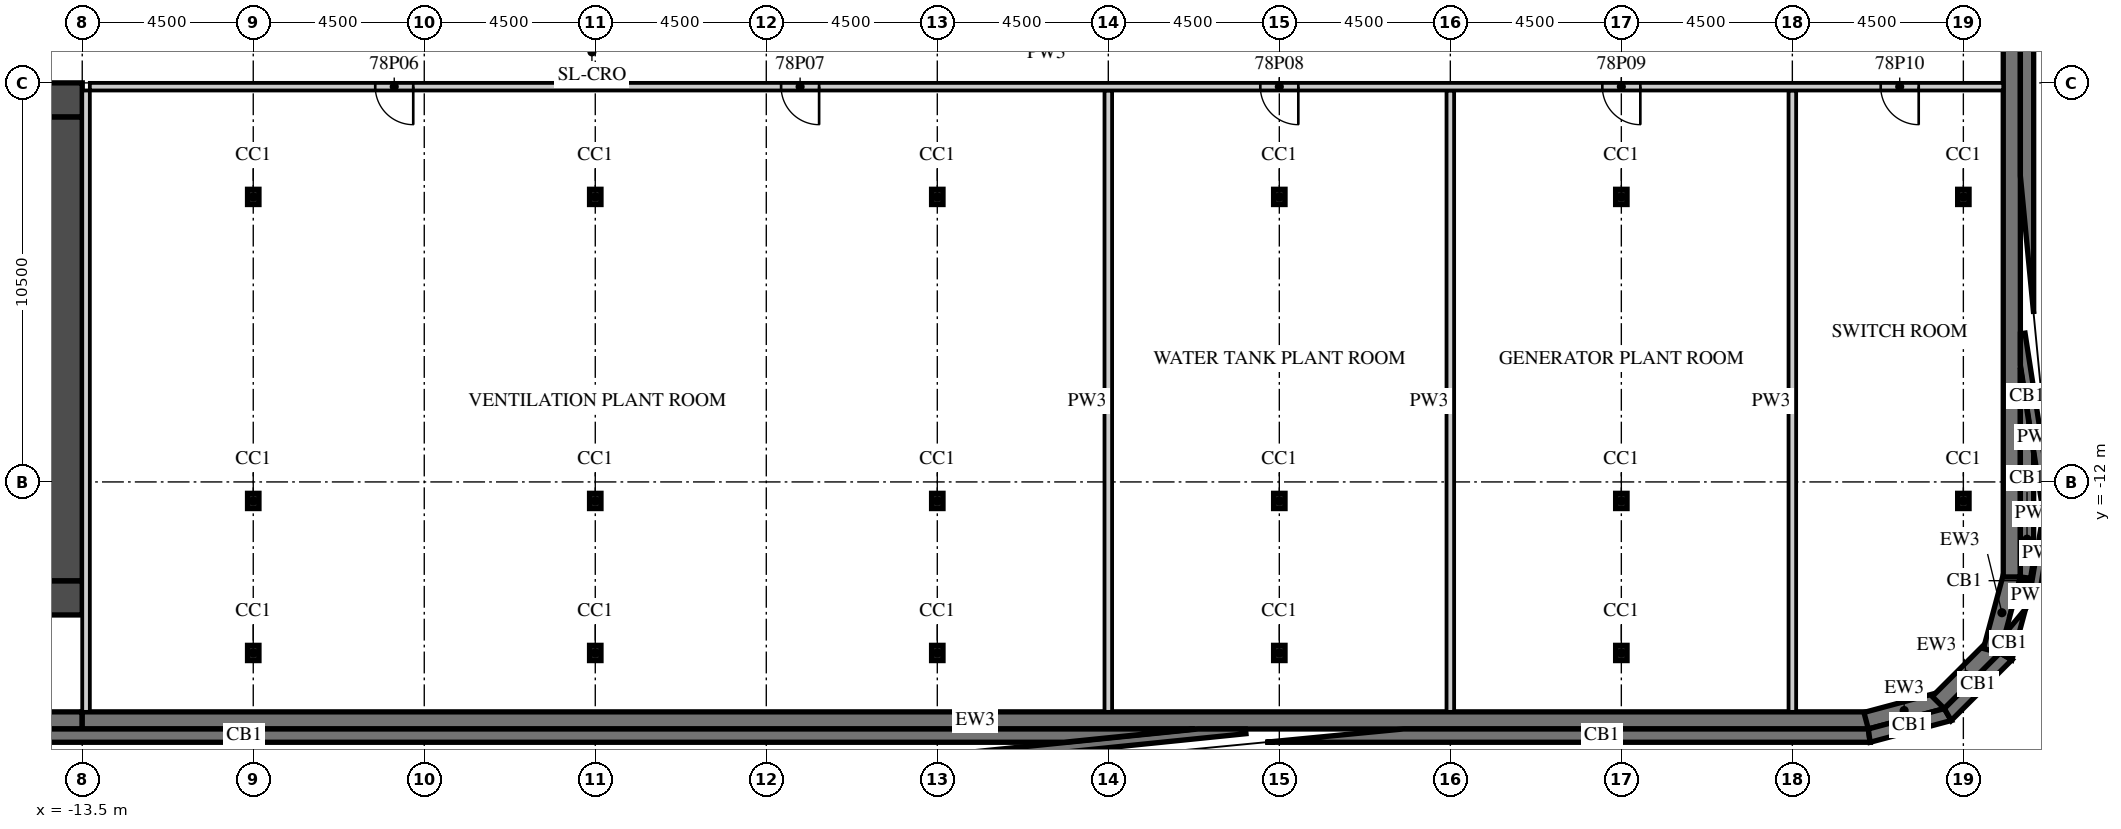
"""IFC4 building model, lengths in metres.
Left out: names, types, materials, properties, quantities, classifications, styles, units other than length and angle.
Written with IfcOpenShell. Run it as: python <this file> out.ifc"""

import sys

from ifc_helpers import new_model, si_unit, direction, frame, frame_2d, origin, origin_2d, place, context, subcontext, project, spatial, polyline, rectangle, i_section, outline, extrude, element, fill, save


model = new_model("IFC4")
c1 = context("Model", 3, precision=1e-05, world=origin(), true_north=direction((0.0, 1.0)))
c2 = subcontext(c1, "Body", "Model", "MODEL_VIEW")
j1 = project(units=[si_unit("LENGTHUNIT", "METRE"), si_unit("PLANEANGLEUNIT", "RADIAN")], contexts=[c1])
p1 = place(None, origin())
s1 = spatial("IfcSite", under=j1, at=p1, CompositionType="ELEMENT")
p2 = place(p1, origin())
s2 = spatial("IfcBuilding", under=s1, at=p2, CompositionType="ELEMENT")
p3 = place(p2, frame((0.0, 0.0, 308.1)))
s3 = spatial("IfcBuildingStorey", under=s2, at=p3, CompositionType="ELEMENT", Elevation=308.1)
for number, where, z_axis, x_axis in (
    (1, (-9.0, -16.5, 0.0), (0.0, 0.0, 1.0), (1.0, 0.0, 0.0)),
    (2, (-9.0, -12.5, 0.0), (0.0, 0.0, 1.0), (1.0, 0.0, 0.0)),
    (3, (-9.0, -4.5, 0.0), (0.0, 0.0, 1.0), (1.0, 0.0, 0.0)),
    (4, (0.0, -16.5, 0.0), (0.0, 0.0, 1.0), (1.0, 0.0, 0.0)),
    (5, (0.0, -12.5, 0.0), (0.0, 0.0, 1.0), (1.0, 0.0, 0.0)),
    (6, (0.0, -4.5, 0.0), (0.0, 0.0, 1.0), (1.0, 0.0, 0.0)),
    (7, (9.0, -16.5, 0.0), (0.0, 0.0, 1.0), (1.0, 0.0, 0.0)),
    (8, (9.0, -12.5, 0.0), (0.0, 0.0, 1.0), (1.0, 0.0, 0.0)),
    (9, (9.0, -4.5, 0.0), (0.0, 0.0, 1.0), (1.0, 0.0, 0.0)),
    (10, (18.0, -16.5, 0.0), (0.0, 0.0, 1.0), (1.0, 0.0, 0.0)),
    (11, (18.0, -12.5, 0.0), (0.0, 0.0, 1.0), (1.0, 0.0, 0.0)),
    (12, (18.0, -4.5, 0.0), (0.0, 0.0, 1.0), (1.0, 0.0, 0.0)),
    (13, (27.0, -16.5, 0.0), (0.0, 0.0, 1.0), (1.0, 0.0, 0.0)),
    (14, (27.0, -12.5, 0.0), (0.0, 0.0, 1.0), (1.0, 0.0, 0.0)),
    (15, (27.0, -4.5, 0.0), (0.0, 0.0, 1.0), (1.0, 0.0, 0.0)),
    (16, (36.0, -12.5, 0.0), (0.0, 0.0, 1.0), (1.0, 0.0, 0.0)),
    (17, (36.0, -4.5, 0.0), (0.0, 0.0, 1.0), (1.0, 0.0, 0.0)),
):
    element("IfcColumn", number, at=place(p3, frame(where, z_axis=z_axis, x_axis=x_axis)), inside=s3, PredefinedType="COLUMN", context=c2, shape_type="SweptSolid", body=[
        extrude(i_section(OverallWidth=0.3, OverallDepth=0.4, WebThickness=0.013, FlangeThickness=0.024, FilletRadius=0.027, at=origin_2d()), origin(), (0.0, 0.0, 1.0), 5.5),
    ])
p4 = place(p3, frame((-31.5, -18.275, 0.0), z_axis=(0.0, 0.0, 1.0), x_axis=(1.0, 0.0, 0.0)))
e18 = element("IfcWall", 18, at=p4, inside=s3, PredefinedType="SOLIDWALL", context=c2, shape_type="SweptSolid", body=[
    extrude(rectangle(XDim=18.0, YDim=0.45, at=frame_2d((9.0, 0.0))), origin(), (0.0, 0.0, 1.0), 5.1),
])
p5 = place(p3, frame((-13.5, -18.275, 0.0), z_axis=(0.0, 0.0, 1.0), x_axis=(1.0, 0.0, 0.0)))
e19 = element("IfcWall", 19, at=p5, inside=s3, PredefinedType="SOLIDWALL", context=c2, shape_type="SweptSolid", body=[
    extrude(rectangle(XDim=47.0, YDim=0.45, at=frame_2d((23.5, 0.0))), origin(), (0.0, 0.0, 1.0), 5.1),
])
p6 = place(p3, frame((33.442, -18.283, 0.0), z_axis=(0.0, 0.0, 1.0), x_axis=(0.965926999034, 0.25881466832, 0.0)))
e20 = element("IfcWall", 20, at=p6, inside=s3, PredefinedType="SOLIDWALL", context=c2, shape_type="SweptSolid", body=[
    extrude(outline(polyline([(0.0, -0.225), (2.071, -0.225), (1.95, 0.225), (0.121, 0.225), (0.0, -0.225)])), origin(), (0.0, 0.0, 1.0), 5.1),
])
p7 = place(p3, frame((35.341, -17.805, 0.0), z_axis=(0.0, 0.0, 1.0), x_axis=(0.707106781187, 0.707106781187, 0.0)))
e21 = element("IfcWall", 21, at=p7, inside=s3, PredefinedType="SOLIDWALL", context=c2, shape_type="SweptSolid", body=[
    extrude(outline(polyline([(0.0, -0.225), (2.071, -0.225), (1.95, 0.225), (0.121, 0.225), (0.0, -0.225)])), origin(), (0.0, 0.0, 1.0), 5.1),
])
p8 = place(p3, frame((36.747, -16.442, 0.0), z_axis=(0.0, 0.0, 1.0), x_axis=(0.25881466832, 0.965926999034, 0.0)))
e22 = element("IfcWall", 22, at=p8, inside=s3, PredefinedType="SOLIDWALL", context=c2, shape_type="SweptSolid", body=[
    extrude(outline(polyline([(-0.0, -0.225), (2.07, -0.225), (1.95, 0.225), (0.12, 0.225), (-0.0, -0.225)])), origin(), (0.0, 0.0, 1.0), 5.1),
])
p9 = place(p3, frame((37.275, -14.5, 0.0), z_axis=(0.0, 0.0, 1.0), x_axis=(0.0, 1.0, 0.0)))
e23 = element("IfcWall", 23, at=p9, inside=s3, PredefinedType="SOLIDWALL", context=c2, shape_type="SweptSolid", body=[
    extrude(rectangle(XDim=29.0, YDim=0.45, at=frame_2d((14.5, 0.0))), origin(), (0.0, 0.0, 1.0), 5.1),
])
p10 = place(p3, origin())
e24 = element("IfcWall", 24, at=p10, inside=s3, PredefinedType="PARAPET", context=c2, shape_type="SweptSolid", body=[
    extrude(outline(polyline([(17.122, -18.624), (17.11, -18.501), (15.864, -18.501), (-33.916, -23.562), (-33.924, -23.815), (17.122, -18.624)])), origin(), (0.0, 0.0, 1.0), 1.1),
])
p11 = place(p3, origin())
e25 = element("IfcWall", 25, at=p11, inside=s3, PredefinedType="PARAPET", context=c2, shape_type="SweptSolid", body=[
    extrude(outline(polyline([(37.501, -12.707), (37.501, -12.957), (38.083, -12.957), (38.378, -12.707), (37.501, -12.707)])), origin(), (0.0, 0.0, 1.0), 1.1),
])
p12 = place(p3, origin())
e26 = element("IfcWall", 26, at=p12, inside=s3, PredefinedType="PARAPET", context=c2, shape_type="SweptSolid", body=[
    extrude(outline(polyline([(38.378, -12.707), (38.083, -12.957), (37.779, -14.771), (38.014, -14.878), (38.378, -12.707)])), origin(), (0.0, 0.0, 1.0), 1.1),
])
p13 = place(p3, origin())
e27 = element("IfcWall", 27, at=p13, inside=s3, PredefinedType="PARAPET", context=c2, shape_type="SweptSolid", body=[
    extrude(outline(polyline([(38.014, -14.878), (37.779, -14.771), (37.505, -15.103), (37.698, -15.262), (38.014, -14.878)])), origin(), (0.0, 0.0, 1.0), 1.1),
])
p14 = place(p3, origin())
e28 = element("IfcWall", 28, at=p14, inside=s3, PredefinedType="PARAPET", context=c2, shape_type="SweptSolid", body=[
    extrude(outline(polyline([(37.624, -8.084), (37.501, -8.103), (37.501, -8.929), (38.084, -12.707), (38.376, -12.957), (37.624, -8.084)])), origin(), (0.0, 0.0, 1.0), 1.1),
])
p15 = place(p3, origin())
e29 = element("IfcWall", 29, at=p15, inside=s3, PredefinedType="SOLIDWALL", context=c2, shape_type="SweptSolid", body=[
    extrude(outline(polyline([(-32.5, -18.5), (-32.546, -18.85), (12.333, -18.85), (15.775, -18.5), (-32.5, -18.5)])), origin(), (0.0, 0.0, 1.0), 2.0),
])
p16 = place(p3, origin())
e30 = element("IfcWall", 30, at=p16, inside=s3, PredefinedType="SOLIDWALL", context=c2, shape_type="SweptSolid", body=[
    extrude(outline(polyline([(21.27, -18.5), (17.635, -18.85), (33.546, -18.85), (33.5, -18.5), (21.27, -18.5)])), origin(), (0.0, 0.0, 1.0), 2.0),
])
p17 = place(p3, origin())
e31 = element("IfcWall", 31, at=p17, inside=s3, PredefinedType="SOLIDWALL", context=c2, shape_type="SweptSolid", body=[
    extrude(outline(polyline([(33.5, -18.5), (33.546, -18.85), (35.681, -18.278), (35.5, -17.964), (33.5, -18.5)])), origin(), (0.0, 0.0, 1.0), 2.0),
])
p18 = place(p3, origin())
e32 = element("IfcWall", 32, at=p18, inside=s3, PredefinedType="SOLIDWALL", context=c2, shape_type="SweptSolid", body=[
    extrude(outline(polyline([(35.5, -17.964), (35.681, -18.278), (37.278, -16.681), (36.964, -16.5), (35.5, -17.964)])), origin(), (0.0, 0.0, 1.0), 2.0),
])
p19 = place(p3, origin())
e33 = element("IfcWall", 33, at=p19, inside=s3, PredefinedType="SOLIDWALL", context=c2, shape_type="SweptSolid", body=[
    extrude(outline(polyline([(36.964, -16.5), (37.278, -16.681), (37.639, -15.334), (37.102, -15.985), (36.964, -16.5)])), origin(), (0.0, 0.0, 1.0), 2.0),
])
p20 = place(p3, origin())
e34 = element("IfcWall", 34, at=p20, inside=s3, PredefinedType="SOLIDWALL", context=c2, shape_type="SweptSolid", body=[
    extrude(outline(polyline([(37.289, -15.287), (37.732, -14.75), (37.768, -14.535), (37.5, -14.5), (37.289, -15.287)])), origin(), (0.0, 0.0, 1.0), 2.0),
])
p21 = place(p3, origin())
e35 = element("IfcWall", 35, at=p21, inside=s3, PredefinedType="SOLIDWALL", context=c2, shape_type="SweptSolid", body=[
    extrude(outline(polyline([(37.5, -14.5), (37.768, -14.535), (37.85, -14.044), (37.85, -12.967), (37.5, -12.967), (37.5, -14.5)])), origin(), (0.0, 0.0, 1.0), 2.0),
])
p22 = place(p3, origin())
e36 = element("IfcWall", 36, at=p22, inside=s3, PredefinedType="SOLIDWALL", context=c2, shape_type="SweptSolid", body=[
    extrude(outline(polyline([(37.5, -12.697), (37.85, -12.697), (37.85, -11.254), (37.5, -8.988), (37.5, -12.697)])), origin(), (0.0, 0.0, 1.0), 2.0),
])
p23 = place(p3, origin())
e37 = element("IfcWall", 37, at=p23, inside=s3, PredefinedType="SOLIDWALL", context=c2, shape_type="SweptSolid", body=[
    extrude(outline(polyline([(37.5, -3.943), (37.85, -7.578), (37.85, 14.546), (37.5, 14.5), (37.5, -3.943)])), origin(), (0.0, 0.0, 1.0), 2.0),
])
p24 = place(p3, frame((-31.5, -1.95, 0.0), z_axis=(0.0, 0.0, 1.0), x_axis=(1.0, 0.0, 0.0)))
e38 = element("IfcWall", 38, at=p24, inside=s3, PredefinedType="SHEAR", context=c2, shape_type="SweptSolid", body=[
    extrude(rectangle(XDim=18.0, YDim=0.9, at=frame_2d((9.0, 0.0))), origin(), (0.0, 0.0, 1.0), 5.1),
])
p25 = place(p24, frame((14.725, 0.0, 0.0)))
e39 = element("IfcOpeningElement", 39, at=p25, cuts=e38, PredefinedType="OPENING", context=c2, shape_type="SweptSolid", body=[
    extrude(rectangle(XDim=1.8, YDim=2.1, at=frame_2d((0.9, 1.05))), frame((0.0, 0.46, 0.0), z_axis=(0.0, -1.0, 0.0), x_axis=(1.0, 0.0, 0.0)), (0.0, 0.0, 1.0), 0.92),
])
p26 = place(p3, frame((-20.3, -15.05, 0.0), z_axis=(0.0, 0.0, 1.0), x_axis=(1.0, 0.0, 0.0)))
e40 = element("IfcWall", 40, at=p26, inside=s3, PredefinedType="SHEAR", context=c2, shape_type="SweptSolid", body=[
    extrude(rectangle(XDim=6.8, YDim=0.9, at=frame_2d((3.4, 0.0))), origin(), (0.0, 0.0, 1.0), 5.1),
])
p27 = place(p26, frame((0.875, 0.0, 0.0)))
e41 = element("IfcOpeningElement", 41, at=p27, cuts=e40, PredefinedType="OPENING", context=c2, shape_type="SweptSolid", body=[
    extrude(rectangle(XDim=1.2, YDim=2.1, at=frame_2d((0.6, 1.05))), frame((0.0, 0.46, 0.0), z_axis=(0.0, -1.0, 0.0), x_axis=(1.0, 0.0, 0.0)), (0.0, 0.0, 1.0), 0.92),
])
p28 = place(p3, frame((-13.95, -14.6, 0.0), z_axis=(0.0, 0.0, 1.0), x_axis=(0.0, 1.0, 0.0)))
e42 = element("IfcWall", 42, at=p28, inside=s3, PredefinedType="SHEAR", context=c2, shape_type="SweptSolid", body=[
    extrude(rectangle(XDim=12.2, YDim=0.9, at=frame_2d((6.1, 0.0))), origin(), (0.0, 0.0, 1.0), 5.1),
])
for number, where, z_axis, x_axis in (
    (43, (13.5, -18.05, 0.0), (0.0, 0.0, 1.0), (0.0, 1.0, 0.0)),
    (44, (22.5, -18.05, 0.0), (0.0, 0.0, 1.0), (0.0, 1.0, 0.0)),
    (45, (31.5, -18.05, 0.0), (0.0, 0.0, 1.0), (0.0, 1.0, 0.0)),
):
    element("IfcWall", number, at=place(p3, frame(where, z_axis=z_axis, x_axis=x_axis)), inside=s3, PredefinedType="PARTITIONING", context=c2, shape_type="SweptSolid", body=[
        extrude(rectangle(XDim=16.35, YDim=0.2, at=frame_2d((8.175, 0.0))), origin(), (0.0, 0.0, 1.0), 5.1),
    ])
p29 = place(p3, frame((-13.3, -1.6, 0.0), z_axis=(0.0, 0.0, 1.0), x_axis=(1.0, 0.0, 0.0)))
e46 = element("IfcWall", 46, at=p29, inside=s3, PredefinedType="PARTITIONING", context=c2, shape_type="SweptSolid", body=[
    extrude(rectangle(XDim=50.35, YDim=0.2, at=frame_2d((25.175, 0.0))), origin(), (0.0, 0.0, 1.0), 4.6),
])
p30 = place(p29, frame((7.51, 0.0, 0.0)))
e47 = element("IfcOpeningElement", 47, at=p30, cuts=e46, PredefinedType="OPENING", context=c2, shape_type="SweptSolid", body=[
    extrude(rectangle(XDim=1.0, YDim=2.1, at=frame_2d((0.5, 1.05))), frame((0.0, 0.11, 0.0), z_axis=(0.0, -1.0, 0.0), x_axis=(1.0, 0.0, 0.0)), (0.0, 0.0, 1.0), 0.22),
])
p31 = place(p29, frame((18.19, 0.0, 0.0)))
e48 = element("IfcOpeningElement", 48, at=p31, cuts=e46, PredefinedType="OPENING", context=c2, shape_type="SweptSolid", body=[
    extrude(rectangle(XDim=1.0, YDim=2.1, at=frame_2d((0.5, 1.05))), frame((0.0, 0.11, 0.0), z_axis=(0.0, -1.0, 0.0), x_axis=(1.0, 0.0, 0.0)), (0.0, 0.0, 1.0), 0.22),
])
p32 = place(p29, frame((30.8, 0.0, 0.0)))
e49 = element("IfcOpeningElement", 49, at=p32, cuts=e46, PredefinedType="OPENING", context=c2, shape_type="SweptSolid", body=[
    extrude(rectangle(XDim=1.0, YDim=2.1, at=frame_2d((0.5, 1.05))), frame((0.0, 0.11, 0.0), z_axis=(0.0, -1.0, 0.0), x_axis=(1.0, 0.0, 0.0)), (0.0, 0.0, 1.0), 0.22),
])
p33 = place(p29, frame((39.8, 0.0, 0.0)))
e50 = element("IfcOpeningElement", 50, at=p33, cuts=e46, PredefinedType="OPENING", context=c2, shape_type="SweptSolid", body=[
    extrude(rectangle(XDim=1.0, YDim=2.1, at=frame_2d((0.5, 1.05))), frame((0.0, 0.11, 0.0), z_axis=(0.0, -1.0, 0.0), x_axis=(1.0, 0.0, 0.0)), (0.0, 0.0, 1.0), 0.22),
])
p34 = place(p29, frame((47.125, 0.0, 0.0)))
e51 = element("IfcOpeningElement", 51, at=p34, cuts=e46, PredefinedType="OPENING", context=c2, shape_type="SweptSolid", body=[
    extrude(rectangle(XDim=1.0, YDim=2.1, at=frame_2d((0.5, 1.05))), frame((0.0, 0.11, 0.0), z_axis=(0.0, -1.0, 0.0), x_axis=(1.0, 0.0, 0.0)), (0.0, 0.0, 1.0), 0.22),
])
p35 = place(p3, frame((-13.4, -18.05, 0.0), z_axis=(0.0, 0.0, 1.0), x_axis=(0.0, 1.0, 0.0)))
e52 = element("IfcWall", 52, at=p35, inside=s3, PredefinedType="PARTITIONING", context=c2, shape_type="SweptSolid", body=[
    extrude(rectangle(XDim=16.35, YDim=0.2, at=frame_2d((8.175, 0.0))), origin(), (0.0, 0.0, 1.0), 5.1),
])
p36 = place(p30, origin())
e53 = element("IfcDoor", 53, at=p36, inside=s3, OperationType="SINGLE_SWING_RIGHT", PredefinedType="DOOR", context=c2, shape_type="SweptSolid", body=[
    extrude(rectangle(XDim=1.0, YDim=2.1, at=frame_2d((0.5, 1.05))), frame((0.0, 0.025, 0.0), z_axis=(0.0, -1.0, 0.0), x_axis=(1.0, 0.0, 0.0)), (0.0, 0.0, 1.0), 0.05),
])
fill(e47, e53)
p37 = place(p31, origin())
e54 = element("IfcDoor", 54, at=p37, inside=s3, OperationType="SINGLE_SWING_RIGHT", PredefinedType="DOOR", context=c2, shape_type="SweptSolid", body=[
    extrude(rectangle(XDim=1.0, YDim=2.1, at=frame_2d((0.5, 1.05))), frame((0.0, 0.025, 0.0), z_axis=(0.0, -1.0, 0.0), x_axis=(1.0, 0.0, 0.0)), (0.0, 0.0, 1.0), 0.05),
])
fill(e48, e54)
p38 = place(p32, origin())
e55 = element("IfcDoor", 55, at=p38, inside=s3, OperationType="SINGLE_SWING_RIGHT", PredefinedType="DOOR", context=c2, shape_type="SweptSolid", body=[
    extrude(rectangle(XDim=1.0, YDim=2.1, at=frame_2d((0.5, 1.05))), frame((0.0, 0.025, 0.0), z_axis=(0.0, -1.0, 0.0), x_axis=(1.0, 0.0, 0.0)), (0.0, 0.0, 1.0), 0.05),
])
fill(e49, e55)
p39 = place(p33, origin())
e56 = element("IfcDoor", 56, at=p39, inside=s3, OperationType="SINGLE_SWING_RIGHT", PredefinedType="DOOR", context=c2, shape_type="SweptSolid", body=[
    extrude(rectangle(XDim=1.0, YDim=2.1, at=frame_2d((0.5, 1.05))), frame((0.0, 0.025, 0.0), z_axis=(0.0, -1.0, 0.0), x_axis=(1.0, 0.0, 0.0)), (0.0, 0.0, 1.0), 0.05),
])
fill(e50, e56)
p40 = place(p34, origin())
e57 = element("IfcDoor", 57, at=p40, inside=s3, OperationType="SINGLE_SWING_RIGHT", PredefinedType="DOOR", context=c2, shape_type="SweptSolid", body=[
    extrude(rectangle(XDim=1.0, YDim=2.1, at=frame_2d((0.5, 1.05))), frame((0.0, 0.025, 0.0), z_axis=(0.0, -1.0, 0.0), x_axis=(1.0, 0.0, 0.0)), (0.0, 0.0, 1.0), 0.05),
])
fill(e51, e57)
save(model, sys.argv[1])
